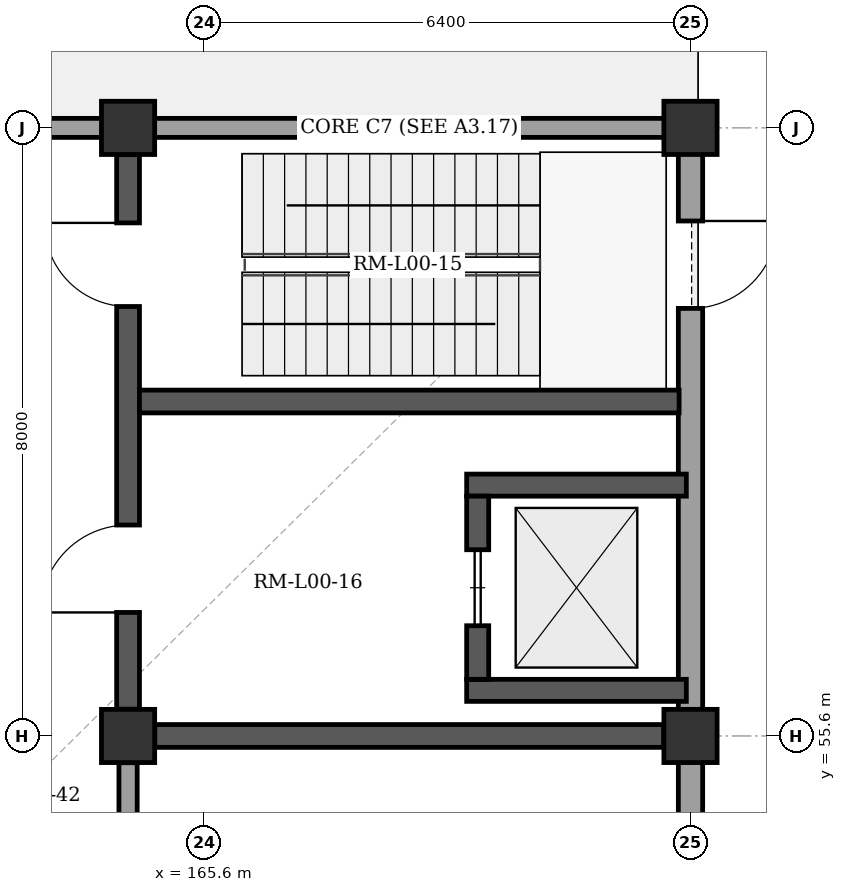
"""IFC4 building model, lengths in metres.
Left out: names, types, materials, properties, quantities, classifications, styles, units other than length and angle.
Written with IfcOpenShell. Run it as: python <this file> out.ifc"""

import sys

from ifc_helpers import new_model, si_unit, direction, frame, frame_2d, origin, origin_2d, place, context, subcontext, project, spatial, rectangle, extrude, element, fill, save


model = new_model("IFC4")
c1 = context("Model", 3, precision=1e-05, world=origin(), true_north=direction((0.0, 1.0)))
c2 = subcontext(c1, "Body", "Model", "MODEL_VIEW")
j1 = project(units=[si_unit("LENGTHUNIT", "METRE"), si_unit("PLANEANGLEUNIT", "RADIAN")], contexts=[c1])
p1 = place(None, origin())
s1 = spatial("IfcSite", under=j1, at=p1, CompositionType="ELEMENT")
p2 = place(p1, origin())
s2 = spatial("IfcBuilding", under=s1, at=p2, CompositionType="ELEMENT")
p3 = place(p2, origin())
s3 = spatial("IfcBuildingStorey", under=s2, at=p3, CompositionType="ELEMENT", Elevation=0.0)
for number, where, z_axis, x_axis in (
    (1, (164.6, 55.6, 0.0), (0.0, 0.0, 1.0), (1.0, 0.0, 0.0)),
    (2, (164.6, 63.6, 0.0), (0.0, 0.0, 1.0), (1.0, 0.0, 0.0)),
    (3, (172.0, 55.6, 0.0), (0.0, 0.0, 1.0), (1.0, 0.0, 0.0)),
    (4, (172.0, 63.6, 0.0), (0.0, 0.0, 1.0), (1.0, 0.0, 0.0)),
):
    element("IfcColumn", number, at=place(p3, frame(where, z_axis=z_axis, x_axis=x_axis)), inside=s3, PredefinedType="COLUMN", context=c2, shape_type="SweptSolid", body=[
        extrude(rectangle(XDim=0.7, YDim=0.7, at=origin_2d()), origin(), (0.0, 0.0, 1.0), 5.4),
    ])
p4 = place(p3, frame((149.2, 63.6, 0.0), z_axis=(0.0, 0.0, 1.0), x_axis=(1.0, 0.0, 0.0)))
e5 = element("IfcWall", 5, at=p4, inside=s3, PredefinedType="SOLIDWALL", context=c2, shape_type="SweptSolid", body=[
    extrude(rectangle(XDim=22.8, YDim=0.25, at=frame_2d((11.4, 0.0))), origin(), (0.0, 0.0, 1.0), 4.29),
])
p5 = place(p4, frame((2.2, 0.0, 0.9)))
e6 = element("IfcOpeningElement", 6, at=p5, cuts=e5, PredefinedType="OPENING", context=c2, shape_type="SweptSolid", body=[
    extrude(rectangle(XDim=2.9, YDim=2.4, at=frame_2d((1.45, 1.2))), frame((0.0, 0.135, 0.0), z_axis=(0.0, -1.0, 0.0), x_axis=(1.0, 0.0, 0.0)), (0.0, 0.0, 1.0), 0.27),
])
p6 = place(p4, frame((8.6, 0.0, 0.9)))
e7 = element("IfcOpeningElement", 7, at=p6, cuts=e5, PredefinedType="OPENING", context=c2, shape_type="SweptSolid", body=[
    extrude(rectangle(XDim=3.0, YDim=2.45, at=frame_2d((1.5, 1.225))), frame((0.0, 0.135, 0.0), z_axis=(0.0, -1.0, 0.0), x_axis=(1.0, 0.0, 0.0)), (0.0, 0.0, 1.0), 0.27),
])
p7 = place(p3, frame((172.0, 63.6, 0.0), z_axis=(0.0, 0.0, 1.0), x_axis=(0.0, -1.0, 0.0)))
e8 = element("IfcWall", 8, at=p7, inside=s3, PredefinedType="SOLIDWALL", context=c2, shape_type="SweptSolid", body=[
    extrude(rectangle(XDim=56.0, YDim=0.32, at=frame_2d((28.0, 0.0))), origin(), (0.0, 0.0, 1.0), 4.29),
])
p8 = place(p7, frame((1.225, 0.0, 0.0)))
e9 = element("IfcOpeningElement", 9, at=p8, cuts=e8, PredefinedType="OPENING", context=c2, shape_type="SweptSolid", body=[
    extrude(rectangle(XDim=1.15, YDim=2.2, at=frame_2d((0.575, 1.1))), frame((0.0, 0.17, 0.0), z_axis=(0.0, -1.0, 0.0), x_axis=(1.0, 0.0, 0.0)), (0.0, 0.0, 1.0), 0.34),
])
p9 = place(p7, frame((52.9, 0.0, 0.0)))
e10 = element("IfcOpeningElement", 10, at=p9, cuts=e8, PredefinedType="OPENING", context=c2, shape_type="SweptSolid", body=[
    extrude(rectangle(XDim=2.0, YDim=2.5, at=frame_2d((1.0, 1.25))), frame((0.0, 0.17, 0.0), z_axis=(0.0, -1.0, 0.0), x_axis=(1.0, 0.0, 0.0)), (0.0, 0.0, 1.0), 0.34),
])
p10 = place(p7, frame((10.933, 0.0, 0.8)))
e11 = element("IfcOpeningElement", 11, at=p10, cuts=e8, PredefinedType="OPENING", context=c2, shape_type="SweptSolid", body=[
    extrude(rectangle(XDim=2.3, YDim=2.25, at=frame_2d((1.15, 1.125))), frame((0.0, 0.17, 0.0), z_axis=(0.0, -1.0, 0.0), x_axis=(1.0, 0.0, 0.0)), (0.0, 0.0, 1.0), 0.34),
])
p11 = place(p7, frame((19.667, 0.0, 0.8)))
e12 = element("IfcOpeningElement", 12, at=p11, cuts=e8, PredefinedType="OPENING", context=c2, shape_type="SweptSolid", body=[
    extrude(rectangle(XDim=2.4, YDim=2.3, at=frame_2d((1.2, 1.15))), frame((0.0, 0.17, 0.0), z_axis=(0.0, -1.0, 0.0), x_axis=(1.0, 0.0, 0.0)), (0.0, 0.0, 1.0), 0.34),
])
p12 = place(p7, frame((28.4, 0.0, 0.8)))
e13 = element("IfcOpeningElement", 13, at=p12, cuts=e8, PredefinedType="OPENING", context=c2, shape_type="SweptSolid", body=[
    extrude(rectangle(XDim=2.5, YDim=2.3, at=frame_2d((1.25, 1.15))), frame((0.0, 0.17, 0.0), z_axis=(0.0, -1.0, 0.0), x_axis=(1.0, 0.0, 0.0)), (0.0, 0.0, 1.0), 0.34),
])
p13 = place(p7, frame((37.133, 0.0, 0.8)))
e14 = element("IfcOpeningElement", 14, at=p13, cuts=e8, PredefinedType="OPENING", context=c2, shape_type="SweptSolid", body=[
    extrude(rectangle(XDim=1.6, YDim=2.75, at=frame_2d((0.8, 1.375))), frame((0.0, 0.17, 0.0), z_axis=(0.0, -1.0, 0.0), x_axis=(1.0, 0.0, 0.0)), (0.0, 0.0, 1.0), 0.34),
])
p14 = place(p7, frame((45.117, 0.0, 0.8)))
e15 = element("IfcOpeningElement", 15, at=p14, cuts=e8, PredefinedType="OPENING", context=c2, shape_type="SweptSolid", body=[
    extrude(rectangle(XDim=1.85, YDim=2.75, at=frame_2d((0.925, 1.375))), frame((0.0, 0.17, 0.0), z_axis=(0.0, -1.0, 0.0), x_axis=(1.0, 0.0, 0.0)), (0.0, 0.0, 1.0), 0.34),
])
p15 = place(p3, frame((164.952, 55.6, 0.0), z_axis=(0.0, 0.0, 1.0), x_axis=(1.0, 0.0, 0.0)))
e16 = element("IfcWall", 16, at=p15, inside=s3, PredefinedType="SHEAR", context=c2, shape_type="SweptSolid", body=[
    extrude(rectangle(XDim=6.696, YDim=0.3, at=frame_2d((3.348, 0.0))), origin(), (0.0, 0.0, 1.0), 5.14),
])
p16 = place(p3, frame((164.6, 55.952, 0.0), z_axis=(0.0, 0.0, 1.0), x_axis=(0.0, 1.0, 0.0)))
e17 = element("IfcWall", 17, at=p16, inside=s3, PredefinedType="SHEAR", context=c2, shape_type="SweptSolid", body=[
    extrude(rectangle(XDim=7.296, YDim=0.3, at=frame_2d((3.648, 0.0))), origin(), (0.0, 0.0, 1.0), 5.14),
])
p17 = place(p16, frame((5.298, 0.0, 0.0)))
e18 = element("IfcOpeningElement", 18, at=p17, cuts=e17, PredefinedType="OPENING", context=c2, shape_type="SweptSolid", body=[
    extrude(rectangle(XDim=1.1, YDim=2.15, at=frame_2d((0.55, 1.075))), frame((0.0, 0.16, 0.0), z_axis=(0.0, -1.0, 0.0), x_axis=(1.0, 0.0, 0.0)), (0.0, 0.0, 1.0), 0.32),
])
p18 = place(p16, frame((1.273, 0.0, 0.0)))
e19 = element("IfcOpeningElement", 19, at=p18, cuts=e17, PredefinedType="OPENING", context=c2, shape_type="SweptSolid", body=[
    extrude(rectangle(XDim=1.15, YDim=2.2, at=frame_2d((0.575, 1.1))), frame((0.0, 0.16, 0.0), z_axis=(0.0, -1.0, 0.0), x_axis=(1.0, 0.0, 0.0)), (0.0, 0.0, 1.0), 0.32),
])
p19 = place(p3, frame((164.75, 60.0, 0.0), z_axis=(0.0, 0.0, 1.0), x_axis=(1.0, 0.0, 0.0)))
e20 = element("IfcWall", 20, at=p19, inside=s3, PredefinedType="SHEAR", context=c2, shape_type="SweptSolid", body=[
    extrude(rectangle(XDim=7.1, YDim=0.3, at=frame_2d((3.55, 0.0))), origin(), (0.0, 0.0, 1.0), 5.14),
])
for number, where, z_axis, x_axis in (
    (21, (169.055, 56.2, 0.0), (0.0, 0.0, 1.0), (1.0, 0.0, 0.0)),
    (22, (169.055, 58.9, 0.0), (0.0, 0.0, 1.0), (1.0, 0.0, 0.0)),
):
    element("IfcWall", number, at=place(p3, frame(where, z_axis=z_axis, x_axis=x_axis)), inside=s3, PredefinedType="SHEAR", context=c2, shape_type="SweptSolid", body=[
        extrude(rectangle(XDim=2.89, YDim=0.29, at=frame_2d((1.445, 0.0))), origin(), (0.0, 0.0, 1.0), 5.14),
    ])
p20 = place(p3, frame((169.2, 56.345, 0.0), z_axis=(0.0, 0.0, 1.0), x_axis=(0.0, 1.0, 0.0)))
e23 = element("IfcWall", 23, at=p20, inside=s3, PredefinedType="SHEAR", context=c2, shape_type="SweptSolid", body=[
    extrude(rectangle(XDim=2.41, YDim=0.29, at=frame_2d((1.205, 0.0))), origin(), (0.0, 0.0, 1.0), 5.14),
])
p21 = place(p20, frame((0.705, 0.0, 0.0)))
e24 = element("IfcOpeningElement", 24, at=p21, cuts=e23, PredefinedType="OPENING", context=c2, shape_type="SweptSolid", body=[
    extrude(rectangle(XDim=1.0, YDim=2.15, at=frame_2d((0.5, 1.075))), frame((0.0, 0.155, 0.0), z_axis=(0.0, -1.0, 0.0), x_axis=(1.0, 0.0, 0.0)), (0.0, 0.0, 1.0), 0.31),
])
p22 = place(p3, frame((164.6, 55.248, 0.0), z_axis=(0.0, 0.0, 1.0), x_axis=(0.0, -1.0, 0.0)))
e25 = element("IfcWall", 25, at=p22, inside=s3, PredefinedType="PARTITIONING", context=c2, shape_type="SweptSolid", body=[
    extrude(rectangle(XDim=44.648, YDim=0.24, at=frame_2d((22.324, 0.0))), origin(), (0.0, 0.0, 1.0), 4.29),
])
p23 = place(p22, frame((21.849, 0.0, 0.0)))
e26 = element("IfcOpeningElement", 26, at=p23, cuts=e25, PredefinedType="OPENING", context=c2, shape_type="SweptSolid", body=[
    extrude(rectangle(XDim=0.95, YDim=2.1, at=frame_2d((0.475, 1.05))), frame((0.0, 0.13, 0.0), z_axis=(0.0, -1.0, 0.0), x_axis=(1.0, 0.0, 0.0)), (0.0, 0.0, 1.0), 0.26),
])
p24 = place(p22, frame((34.125, 0.0, 0.0)))
e27 = element("IfcOpeningElement", 27, at=p24, cuts=e25, PredefinedType="OPENING", context=c2, shape_type="SweptSolid", body=[
    extrude(rectangle(XDim=1.4, YDim=2.25, at=frame_2d((0.7, 1.125))), frame((0.0, 0.13, 0.0), z_axis=(0.0, -1.0, 0.0), x_axis=(1.0, 0.0, 0.0)), (0.0, 0.0, 1.0), 0.26),
])
p25 = place(p8, origin())
e28 = element("IfcDoor", 28, at=p25, inside=s3, OperationType="SINGLE_SWING_LEFT", PredefinedType="DOOR", context=c2, shape_type="SweptSolid", body=[
    extrude(rectangle(XDim=1.15, YDim=2.2, at=frame_2d((0.575, 1.1))), frame((0.0, 0.025, 0.0), z_axis=(0.0, -1.0, 0.0), x_axis=(1.0, 0.0, 0.0)), (0.0, 0.0, 1.0), 0.05),
])
fill(e9, e28)
p26 = place(p17, origin())
e29 = element("IfcDoor", 29, at=p26, inside=s3, OperationType="SINGLE_SWING_RIGHT", PredefinedType="DOOR", context=c2, shape_type="SweptSolid", body=[
    extrude(rectangle(XDim=1.1, YDim=2.15, at=frame_2d((0.55, 1.075))), frame((0.0, 0.025, 0.0), z_axis=(0.0, -1.0, 0.0), x_axis=(1.0, 0.0, 0.0)), (0.0, 0.0, 1.0), 0.05),
])
fill(e18, e29)
p27 = place(p18, origin())
e30 = element("IfcDoor", 30, at=p27, inside=s3, OperationType="SINGLE_SWING_LEFT", PredefinedType="DOOR", context=c2, shape_type="SweptSolid", body=[
    extrude(rectangle(XDim=1.15, YDim=2.2, at=frame_2d((0.575, 1.1))), frame((0.0, 0.025, 0.0), z_axis=(0.0, -1.0, 0.0), x_axis=(1.0, 0.0, 0.0)), (0.0, 0.0, 1.0), 0.05),
])
fill(e19, e30)
p28 = place(p21, origin())
e31 = element("IfcDoor", 31, at=p28, inside=s3, OperationType="SLIDING_TO_LEFT", PredefinedType="DOOR", context=c2, shape_type="SweptSolid", body=[
    extrude(rectangle(XDim=1.0, YDim=2.15, at=frame_2d((0.5, 1.075))), frame((0.0, 0.025, 0.0), z_axis=(0.0, -1.0, 0.0), x_axis=(1.0, 0.0, 0.0)), (0.0, 0.0, 1.0), 0.05),
])
fill(e24, e31)
save(model, sys.argv[1])
